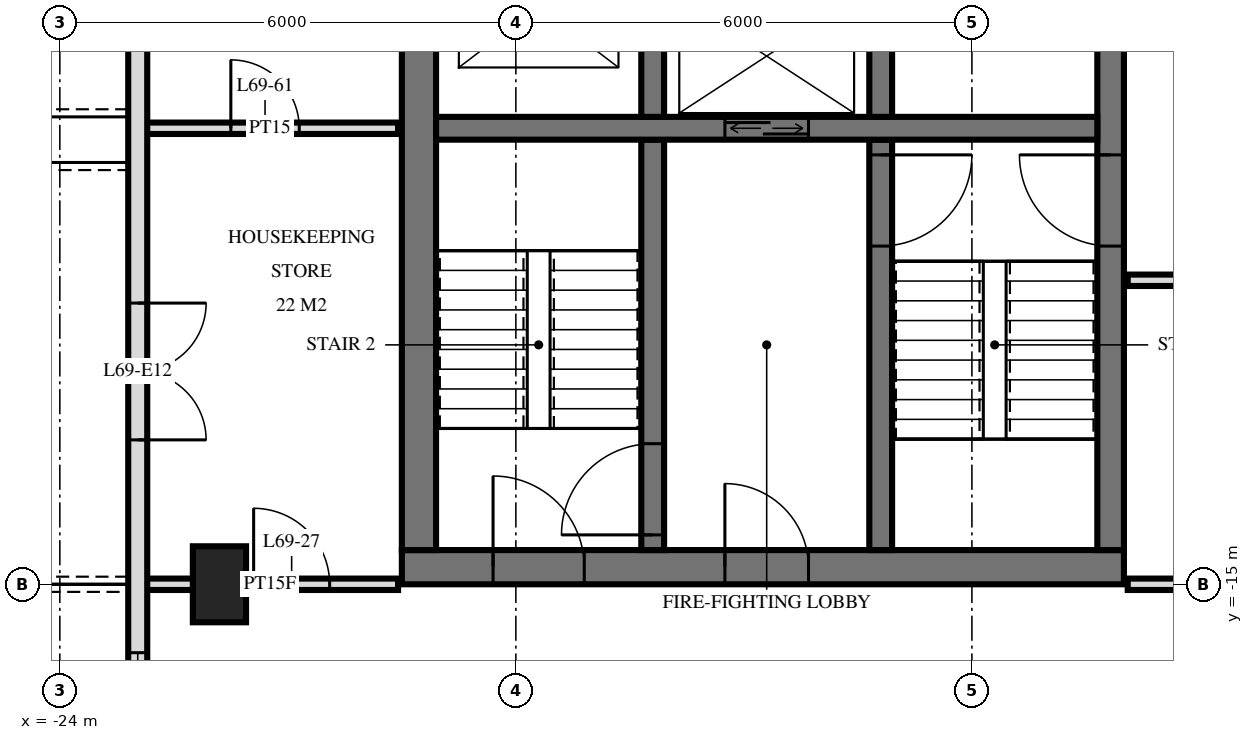
"""IFC4 building model, lengths in metres.
Left out: names, types, materials, properties, quantities, classifications, styles, units other than length and angle.
Written with IfcOpenShell. Run it as: python <this file> out.ifc"""

import sys

from ifc_helpers import new_model, si_unit, direction, frame, frame_2d, origin, origin_2d, place, context, subcontext, project, spatial, rectangle, extrude, element, fill, save


model = new_model("IFC4")
c1 = context("Model", 3, precision=1e-05, world=origin(), true_north=direction((0.0, 1.0)))
c2 = subcontext(c1, "Body", "Model", "MODEL_VIEW")
j1 = project(units=[si_unit("LENGTHUNIT", "METRE"), si_unit("PLANEANGLEUNIT", "RADIAN")], contexts=[c1])
p1 = place(None, origin())
s1 = spatial("IfcSite", under=j1, at=p1, CompositionType="ELEMENT")
p2 = place(p1, origin())
s2 = spatial("IfcBuilding", under=s1, at=p2, CompositionType="ELEMENT")
p3 = place(p2, frame((0.0, 0.0, 263.1)))
s3 = spatial("IfcBuildingStorey", under=s2, at=p3, CompositionType="ELEMENT", Elevation=263.1)
p4 = place(p3, frame((-21.9, -15.0, 0.0), z_axis=(0.0, 0.0, 1.0), x_axis=(0.0, 1.0, 0.0)))
e1 = element("IfcColumn", 1, at=p4, inside=s3, PredefinedType="COLUMN", context=c2, shape_type="SweptSolid", body=[
    extrude(rectangle(XDim=1.0, YDim=0.7, at=origin_2d()), origin(), (0.0, 0.0, 1.0), 3.5),
])
p5 = place(p3, frame((-19.5, -14.775, 0.0), z_axis=(0.0, 0.0, 1.0), x_axis=(1.0, 0.0, 0.0)))
e2 = element("IfcWall", 2, at=p5, inside=s3, PredefinedType="SHEAR", context=c2, shape_type="SweptSolid", body=[
    extrude(rectangle(XDim=9.5, YDim=0.45, at=frame_2d((4.75, 0.0))), origin(), (0.0, 0.0, 1.0), 3.5),
])
p6 = place(p5, frame((1.2, 0.0, 0.0)))
e3 = element("IfcOpeningElement", 3, at=p6, cuts=e2, PredefinedType="OPENING", context=c2, shape_type="SweptSolid", body=[
    extrude(rectangle(XDim=1.2, YDim=2.1, at=frame_2d((0.6, 1.05))), frame((0.0, 0.235, 0.0), z_axis=(0.0, -1.0, 0.0), x_axis=(1.0, 0.0, 0.0)), (0.0, 0.0, 1.0), 0.47),
])
p7 = place(p5, frame((4.25, 0.0, 0.0)))
e4 = element("IfcOpeningElement", 4, at=p7, cuts=e2, PredefinedType="OPENING", context=c2, shape_type="SweptSolid", body=[
    extrude(rectangle(XDim=1.1, YDim=2.1, at=frame_2d((0.55, 1.05))), frame((0.0, 0.235, 0.0), z_axis=(0.0, -1.0, 0.0), x_axis=(1.0, 0.0, 0.0)), (0.0, 0.0, 1.0), 0.47),
])
p8 = place(p3, frame((-10.175, -14.55, 0.0), z_axis=(0.0, 0.0, 1.0), x_axis=(0.0, 1.0, 0.0)))
e5 = element("IfcWall", 5, at=p8, inside=s3, PredefinedType="SHEAR", context=c2, shape_type="SweptSolid", body=[
    extrude(rectangle(XDim=14.1, YDim=0.35, at=frame_2d((7.05, 0.0))), origin(), (0.0, 0.0, 1.0), 3.5),
])
p9 = place(p8, frame((8.4, 0.0, 0.0)))
e6 = element("IfcOpeningElement", 6, at=p9, cuts=e5, PredefinedType="OPENING", context=c2, shape_type="SweptSolid", body=[
    extrude(rectangle(XDim=1.4, YDim=2.4, at=frame_2d((0.7, 1.2))), frame((0.0, 0.185, 0.0), z_axis=(0.0, -1.0, 0.0), x_axis=(1.0, 0.0, 0.0)), (0.0, 0.0, 1.0), 0.37),
])
p10 = place(p8, frame((10.0, 0.0, 0.0)))
e7 = element("IfcOpeningElement", 7, at=p10, cuts=e5, PredefinedType="OPENING", context=c2, shape_type="SweptSolid", body=[
    extrude(rectangle(XDim=1.4, YDim=2.4, at=frame_2d((0.7, 1.2))), frame((0.0, 0.185, 0.0), z_axis=(0.0, -1.0, 0.0), x_axis=(1.0, 0.0, 0.0)), (0.0, 0.0, 1.0), 0.37),
])
p11 = place(p8, frame((4.0, 0.0, 0.0)))
e8 = element("IfcOpeningElement", 8, at=p11, cuts=e5, PredefinedType="OPENING", context=c2, shape_type="SweptSolid", body=[
    extrude(rectangle(XDim=1.2, YDim=2.1, at=frame_2d((0.6, 1.05))), frame((0.0, 0.185, 0.0), z_axis=(0.0, -1.0, 0.0), x_axis=(1.0, 0.0, 0.0)), (0.0, 0.0, 1.0), 0.37),
])
p12 = place(p3, frame((-19.275, -14.55, 0.0), z_axis=(0.0, 0.0, 1.0), x_axis=(0.0, 1.0, 0.0)))
e9 = element("IfcWall", 9, at=p12, inside=s3, PredefinedType="SHEAR", context=c2, shape_type="SweptSolid", body=[
    extrude(rectangle(XDim=14.1, YDim=0.45, at=frame_2d((7.05, 0.0))), origin(), (0.0, 0.0, 1.0), 3.5),
])
p13 = place(p3, frame((-19.05, -9.0, 0.0), z_axis=(0.0, 0.0, 1.0), x_axis=(1.0, 0.0, 0.0)))
e10 = element("IfcWall", 10, at=p13, inside=s3, PredefinedType="SHEAR", context=c2, shape_type="SweptSolid", body=[
    extrude(rectangle(XDim=8.7, YDim=0.3, at=frame_2d((4.35, 0.0))), origin(), (0.0, 0.0, 1.0), 3.5),
])
p14 = place(p13, frame((3.8, 0.0, 0.0)))
e11 = element("IfcOpeningElement", 11, at=p14, cuts=e10, PredefinedType="OPENING", context=c2, shape_type="SweptSolid", body=[
    extrude(rectangle(XDim=1.1, YDim=2.1, at=frame_2d((0.55, 1.05))), frame((0.0, 0.16, 0.0), z_axis=(0.0, -1.0, 0.0), x_axis=(1.0, 0.0, 0.0)), (0.0, 0.0, 1.0), 0.32),
])
p15 = place(p3, frame((-13.2, -8.85, 0.0), z_axis=(0.0, 0.0, 1.0), x_axis=(0.0, 1.0, 0.0)))
e12 = element("IfcWall", 12, at=p15, inside=s3, PredefinedType="SHEAR", context=c2, shape_type="SweptSolid", body=[
    extrude(rectangle(XDim=2.3, YDim=0.3, at=frame_2d((1.15, 0.0))), origin(), (0.0, 0.0, 1.0), 3.5),
])
p16 = place(p3, frame((-13.2, -14.55, 0.0), z_axis=(0.0, 0.0, 1.0), x_axis=(0.0, 1.0, 0.0)))
e13 = element("IfcWall", 13, at=p16, inside=s3, PredefinedType="SHEAR", context=c2, shape_type="SweptSolid", body=[
    extrude(rectangle(XDim=5.4, YDim=0.3, at=frame_2d((2.7, 0.0))), origin(), (0.0, 0.0, 1.0), 3.5),
])
p17 = place(p16, frame((4.0, 0.0, 0.0)))
e14 = element("IfcOpeningElement", 14, at=p17, cuts=e13, PredefinedType="OPENING", context=c2, shape_type="SweptSolid", body=[
    extrude(rectangle(XDim=1.2, YDim=2.1, at=frame_2d((0.6, 1.05))), frame((0.0, 0.16, 0.0), z_axis=(0.0, -1.0, 0.0), x_axis=(1.0, 0.0, 0.0)), (0.0, 0.0, 1.0), 0.32),
])
p18 = place(p3, frame((-16.2, -8.85, 0.0), z_axis=(0.0, 0.0, 1.0), x_axis=(0.0, 1.0, 0.0)))
e15 = element("IfcWall", 15, at=p18, inside=s3, PredefinedType="SHEAR", context=c2, shape_type="SweptSolid", body=[
    extrude(rectangle(XDim=2.3, YDim=0.3, at=frame_2d((1.15, 0.0))), origin(), (0.0, 0.0, 1.0), 3.5),
])
p19 = place(p3, frame((-16.2, -14.55, 0.0), z_axis=(0.0, 0.0, 1.0), x_axis=(0.0, 1.0, 0.0)))
e16 = element("IfcWall", 16, at=p19, inside=s3, PredefinedType="SHEAR", context=c2, shape_type="SweptSolid", body=[
    extrude(rectangle(XDim=5.4, YDim=0.3, at=frame_2d((2.7, 0.0))), origin(), (0.0, 0.0, 1.0), 3.5),
])
p20 = place(p19, frame((0.2, 0.0, 0.0)))
e17 = element("IfcOpeningElement", 17, at=p20, cuts=e16, PredefinedType="OPENING", context=c2, shape_type="SweptSolid", body=[
    extrude(rectangle(XDim=1.2, YDim=2.1, at=frame_2d((0.6, 1.05))), frame((0.0, 0.16, 0.0), z_axis=(0.0, -1.0, 0.0), x_axis=(1.0, 0.0, 0.0)), (0.0, 0.0, 1.0), 0.32),
])
p21 = place(p3, frame((-22.975, -3.325, 0.0), z_axis=(0.0, 0.0, 1.0), x_axis=(0.0, -1.0, 0.0)))
e18 = element("IfcWall", 18, at=p21, inside=s3, PredefinedType="SOLIDWALL", context=c2, shape_type="SweptSolid", body=[
    extrude(rectangle(XDim=25.951, YDim=0.25, at=frame_2d((12.975, 0.0))), origin(), (0.0, 0.0, 1.0), 3.22),
])
p22 = place(p21, frame((1.925, 0.0, 0.0)))
e19 = element("IfcOpeningElement", 19, at=p22, cuts=e18, PredefinedType="OPENING", context=c2, shape_type="SweptSolid", body=[
    extrude(rectangle(XDim=1.8, YDim=2.4, at=frame_2d((0.9, 1.2))), frame((0.0, 0.135, 0.0), z_axis=(0.0, -1.0, 0.0), x_axis=(1.0, 0.0, 0.0)), (0.0, 0.0, 1.0), 0.27),
])
p23 = place(p21, frame((7.975, 0.0, 0.0)))
e20 = element("IfcOpeningElement", 20, at=p23, cuts=e18, PredefinedType="OPENING", context=c2, shape_type="SweptSolid", body=[
    extrude(rectangle(XDim=1.8, YDim=2.4, at=frame_2d((0.9, 1.2))), frame((0.0, 0.135, 0.0), z_axis=(0.0, -1.0, 0.0), x_axis=(1.0, 0.0, 0.0)), (0.0, 0.0, 1.0), 0.27),
])
p24 = place(p21, frame((12.575, 0.0, 0.9)))
e21 = element("IfcOpeningElement", 21, at=p24, cuts=e18, PredefinedType="OPENING", context=c2, shape_type="SweptSolid", body=[
    extrude(rectangle(XDim=1.2, YDim=1.5, at=frame_2d((0.6, 0.75))), frame((0.0, 0.135, 0.0), z_axis=(0.0, -1.0, 0.0), x_axis=(1.0, 0.0, 0.0)), (0.0, 0.0, 1.0), 0.27),
])
p25 = place(p21, frame((15.775, 0.0, 0.0)))
e22 = element("IfcOpeningElement", 22, at=p25, cuts=e18, PredefinedType="OPENING", context=c2, shape_type="SweptSolid", body=[
    extrude(rectangle(XDim=1.8, YDim=2.4, at=frame_2d((0.9, 1.2))), frame((0.0, 0.135, 0.0), z_axis=(0.0, -1.0, 0.0), x_axis=(1.0, 0.0, 0.0)), (0.0, 0.0, 1.0), 0.27),
])
p26 = place(p21, frame((21.075, 0.0, 0.0)))
e23 = element("IfcOpeningElement", 23, at=p26, cuts=e18, PredefinedType="OPENING", context=c2, shape_type="SweptSolid", body=[
    extrude(rectangle(XDim=1.8, YDim=2.4, at=frame_2d((0.9, 1.2))), frame((0.0, 0.135, 0.0), z_axis=(0.0, -1.0, 0.0), x_axis=(1.0, 0.0, 0.0)), (0.0, 0.0, 1.0), 0.27),
])
p27 = place(p21, frame((23.825, 0.0, 0.9)))
e24 = element("IfcOpeningElement", 24, at=p27, cuts=e18, PredefinedType="OPENING", context=c2, shape_type="SweptSolid", body=[
    extrude(rectangle(XDim=1.8, YDim=1.5, at=frame_2d((0.9, 0.75))), frame((0.0, 0.135, 0.0), z_axis=(0.0, -1.0, 0.0), x_axis=(1.0, 0.0, 0.0)), (0.0, 0.0, 1.0), 0.27),
])
p28 = place(p3, frame((-22.92, -15.0, 0.0), z_axis=(0.0, 0.0, 1.0), x_axis=(1.0, 0.0, 0.0)))
e25 = element("IfcWall", 25, at=p28, inside=s3, PredefinedType="PARTITIONING", context=c2, shape_type="SweptSolid", body=[
    extrude(rectangle(XDim=3.37, YDim=0.15, at=frame_2d((1.685, 0.0))), origin(), (0.0, 0.0, 1.0), 3.22),
])
p29 = place(p28, frame((1.47, 0.0, 0.0)))
e26 = element("IfcOpeningElement", 26, at=p29, cuts=e25, PredefinedType="OPENING", context=c2, shape_type="SweptSolid", body=[
    extrude(rectangle(XDim=1.0, YDim=2.1, at=frame_2d((0.5, 1.05))), frame((0.0, 0.085, 0.0), z_axis=(0.0, -1.0, 0.0), x_axis=(1.0, 0.0, 0.0)), (0.0, 0.0, 1.0), 0.17),
])
p30 = place(p3, frame((-9.95, -15.0, 0.0), z_axis=(0.0, 0.0, 1.0), x_axis=(1.0, 0.0, 0.0)))
e27 = element("IfcWall", 27, at=p30, inside=s3, PredefinedType="PARTITIONING", context=c2, shape_type="SweptSolid", body=[
    extrude(rectangle(XDim=19.9, YDim=0.15, at=frame_2d((9.95, 0.0))), origin(), (0.0, 0.0, 1.0), 2.584),
])
p31 = place(p30, frame((9.45, 0.0, 0.0)))
e28 = element("IfcOpeningElement", 28, at=p31, cuts=e27, PredefinedType="OPENING", context=c2, shape_type="SweptSolid", body=[
    extrude(rectangle(XDim=1.0, YDim=2.1, at=frame_2d((0.5, 1.05))), frame((0.0, 0.085, 0.0), z_axis=(0.0, -1.0, 0.0), x_axis=(1.0, 0.0, 0.0)), (0.0, 0.0, 1.0), 0.17),
])
p32 = place(p3, frame((-9.95, -11.0, 0.0), z_axis=(0.0, 0.0, 1.0), x_axis=(1.0, 0.0, 0.0)))
e29 = element("IfcWall", 29, at=p32, inside=s3, PredefinedType="PARTITIONING", context=c2, shape_type="SweptSolid", body=[
    extrude(rectangle(XDim=19.9, YDim=0.15, at=frame_2d((9.95, 0.0))), origin(), (0.0, 0.0, 1.0), 3.22),
])
p33 = place(p32, frame((9.45, 0.0, 0.0)))
e30 = element("IfcOpeningElement", 30, at=p33, cuts=e29, PredefinedType="OPENING", context=c2, shape_type="SweptSolid", body=[
    extrude(rectangle(XDim=1.0, YDim=2.1, at=frame_2d((0.5, 1.05))), frame((0.0, 0.085, 0.0), z_axis=(0.0, -1.0, 0.0), x_axis=(1.0, 0.0, 0.0)), (0.0, 0.0, 1.0), 0.17),
])
p34 = place(p32, frame((3.45, 0.0, 0.0)))
e31 = element("IfcOpeningElement", 31, at=p34, cuts=e29, PredefinedType="OPENING", context=c2, shape_type="SweptSolid", body=[
    extrude(rectangle(XDim=1.0, YDim=2.1, at=frame_2d((0.5, 1.05))), frame((0.0, 0.085, 0.0), z_axis=(0.0, -1.0, 0.0), x_axis=(1.0, 0.0, 0.0)), (0.0, 0.0, 1.0), 0.17),
])
p35 = place(p3, frame((-22.92, -9.0, 0.0), z_axis=(0.0, 0.0, 1.0), x_axis=(1.0, 0.0, 0.0)))
e32 = element("IfcWall", 32, at=p35, inside=s3, PredefinedType="PARTITIONING", context=c2, shape_type="SweptSolid", body=[
    extrude(rectangle(XDim=3.37, YDim=0.15, at=frame_2d((1.685, 0.0))), origin(), (0.0, 0.0, 1.0), 3.22),
])
p36 = place(p35, frame((1.17, 0.0, 0.0)))
e33 = element("IfcOpeningElement", 33, at=p36, cuts=e32, PredefinedType="OPENING", context=c2, shape_type="SweptSolid", body=[
    extrude(rectangle(XDim=0.9, YDim=2.1, at=frame_2d((0.45, 1.05))), frame((0.0, 0.085, 0.0), z_axis=(0.0, -1.0, 0.0), x_axis=(1.0, 0.0, 0.0)), (0.0, 0.0, 1.0), 0.17),
])
p37 = place(p23, origin())
e34 = element("IfcDoor", 34, at=p37, inside=s3, OperationType="DOUBLE_DOOR_SINGLE_SWING", PredefinedType="DOOR", context=c2, shape_type="SweptSolid", body=[
    extrude(rectangle(XDim=1.8, YDim=2.4, at=frame_2d((0.9, 1.2))), frame((0.0, 0.025, 0.0), z_axis=(0.0, -1.0, 0.0), x_axis=(1.0, 0.0, 0.0)), (0.0, 0.0, 1.0), 0.05),
])
fill(e20, e34)
p38 = place(p24, origin())
e35 = element("IfcWindow", 35, at=p38, inside=s3, PartitioningType="SINGLE_PANEL", PredefinedType="WINDOW", context=c2, shape_type="SweptSolid", body=[
    extrude(rectangle(XDim=1.2, YDim=1.5, at=frame_2d((0.6, 0.75))), frame((0.0, 0.03, 0.0), z_axis=(0.0, -1.0, 0.0), x_axis=(1.0, 0.0, 0.0)), (0.0, 0.0, 1.0), 0.06),
])
fill(e21, e35)
p39 = place(p14, origin())
e36 = element("IfcDoor", 36, at=p39, inside=s3, OperationType="DOUBLE_DOOR_SLIDING", PredefinedType="USERDEFINED", context=c2, shape_type="SweptSolid", body=[
    extrude(rectangle(XDim=1.1, YDim=2.1, at=frame_2d((0.55, 1.05))), frame((0.0, 0.025, 0.0), z_axis=(0.0, -1.0, 0.0), x_axis=(1.0, 0.0, 0.0)), (0.0, 0.0, 1.0), 0.05),
])
fill(e11, e36)
p40 = place(p11, origin())
e37 = element("IfcDoor", 37, at=p40, inside=s3, OperationType="SINGLE_SWING_LEFT", PredefinedType="DOOR", context=c2, shape_type="SweptSolid", body=[
    extrude(rectangle(XDim=1.2, YDim=2.1, at=frame_2d((0.6, 1.05))), frame((0.0, 0.025, 0.0), z_axis=(0.0, -1.0, 0.0), x_axis=(1.0, 0.0, 0.0)), (0.0, 0.0, 1.0), 0.05),
])
fill(e8, e37)
p41 = place(p6, origin())
e38 = element("IfcDoor", 38, at=p41, inside=s3, OperationType="SINGLE_SWING_RIGHT", PredefinedType="DOOR", context=c2, shape_type="SweptSolid", body=[
    extrude(rectangle(XDim=1.2, YDim=2.1, at=frame_2d((0.6, 1.05))), frame((0.0, 0.025, 0.0), z_axis=(0.0, -1.0, 0.0), x_axis=(1.0, 0.0, 0.0)), (0.0, 0.0, 1.0), 0.05),
])
fill(e3, e38)
p42 = place(p7, origin())
e39 = element("IfcDoor", 39, at=p42, inside=s3, OperationType="SINGLE_SWING_RIGHT", PredefinedType="DOOR", context=c2, shape_type="SweptSolid", body=[
    extrude(rectangle(XDim=1.1, YDim=2.1, at=frame_2d((0.55, 1.05))), frame((0.0, 0.025, 0.0), z_axis=(0.0, -1.0, 0.0), x_axis=(1.0, 0.0, 0.0)), (0.0, 0.0, 1.0), 0.05),
])
fill(e4, e39)
p43 = place(p17, frame((0.6, 0.0, 0.0), z_axis=(0.0, 0.0, 1.0), x_axis=(-1.0, 0.0, 0.0)))
e40 = element("IfcDoor", 40, at=p43, inside=s3, OperationType="SINGLE_SWING_RIGHT", PredefinedType="DOOR", context=c2, shape_type="SweptSolid", body=[
    extrude(rectangle(XDim=1.2, YDim=2.1, at=frame_2d((0.0, 1.05))), frame((0.0, -0.025, 0.0), z_axis=(0.0, 1.0, 0.0), x_axis=(-1.0, 0.0, 0.0)), (0.0, 0.0, 1.0), 0.05),
])
fill(e14, e40)
p44 = place(p20, origin())
e41 = element("IfcDoor", 41, at=p44, inside=s3, OperationType="SINGLE_SWING_RIGHT", PredefinedType="DOOR", context=c2, shape_type="SweptSolid", body=[
    extrude(rectangle(XDim=1.2, YDim=2.1, at=frame_2d((0.6, 1.05))), frame((0.0, 0.025, 0.0), z_axis=(0.0, -1.0, 0.0), x_axis=(1.0, 0.0, 0.0)), (0.0, 0.0, 1.0), 0.05),
])
fill(e17, e41)
p45 = place(p29, origin())
e42 = element("IfcDoor", 42, at=p45, inside=s3, OperationType="SINGLE_SWING_RIGHT", PredefinedType="DOOR", context=c2, shape_type="SweptSolid", body=[
    extrude(rectangle(XDim=1.0, YDim=2.1, at=frame_2d((0.5, 1.05))), frame((0.0, 0.025, 0.0), z_axis=(0.0, -1.0, 0.0), x_axis=(1.0, 0.0, 0.0)), (0.0, 0.0, 1.0), 0.05),
])
fill(e26, e42)
p46 = place(p36, origin())
e43 = element("IfcDoor", 43, at=p46, inside=s3, OperationType="SINGLE_SWING_RIGHT", PredefinedType="DOOR", context=c2, shape_type="SweptSolid", body=[
    extrude(rectangle(XDim=0.9, YDim=2.1, at=frame_2d((0.45, 1.05))), frame((0.0, 0.025, 0.0), z_axis=(0.0, -1.0, 0.0), x_axis=(1.0, 0.0, 0.0)), (0.0, 0.0, 1.0), 0.05),
])
fill(e33, e43)
save(model, sys.argv[1])
